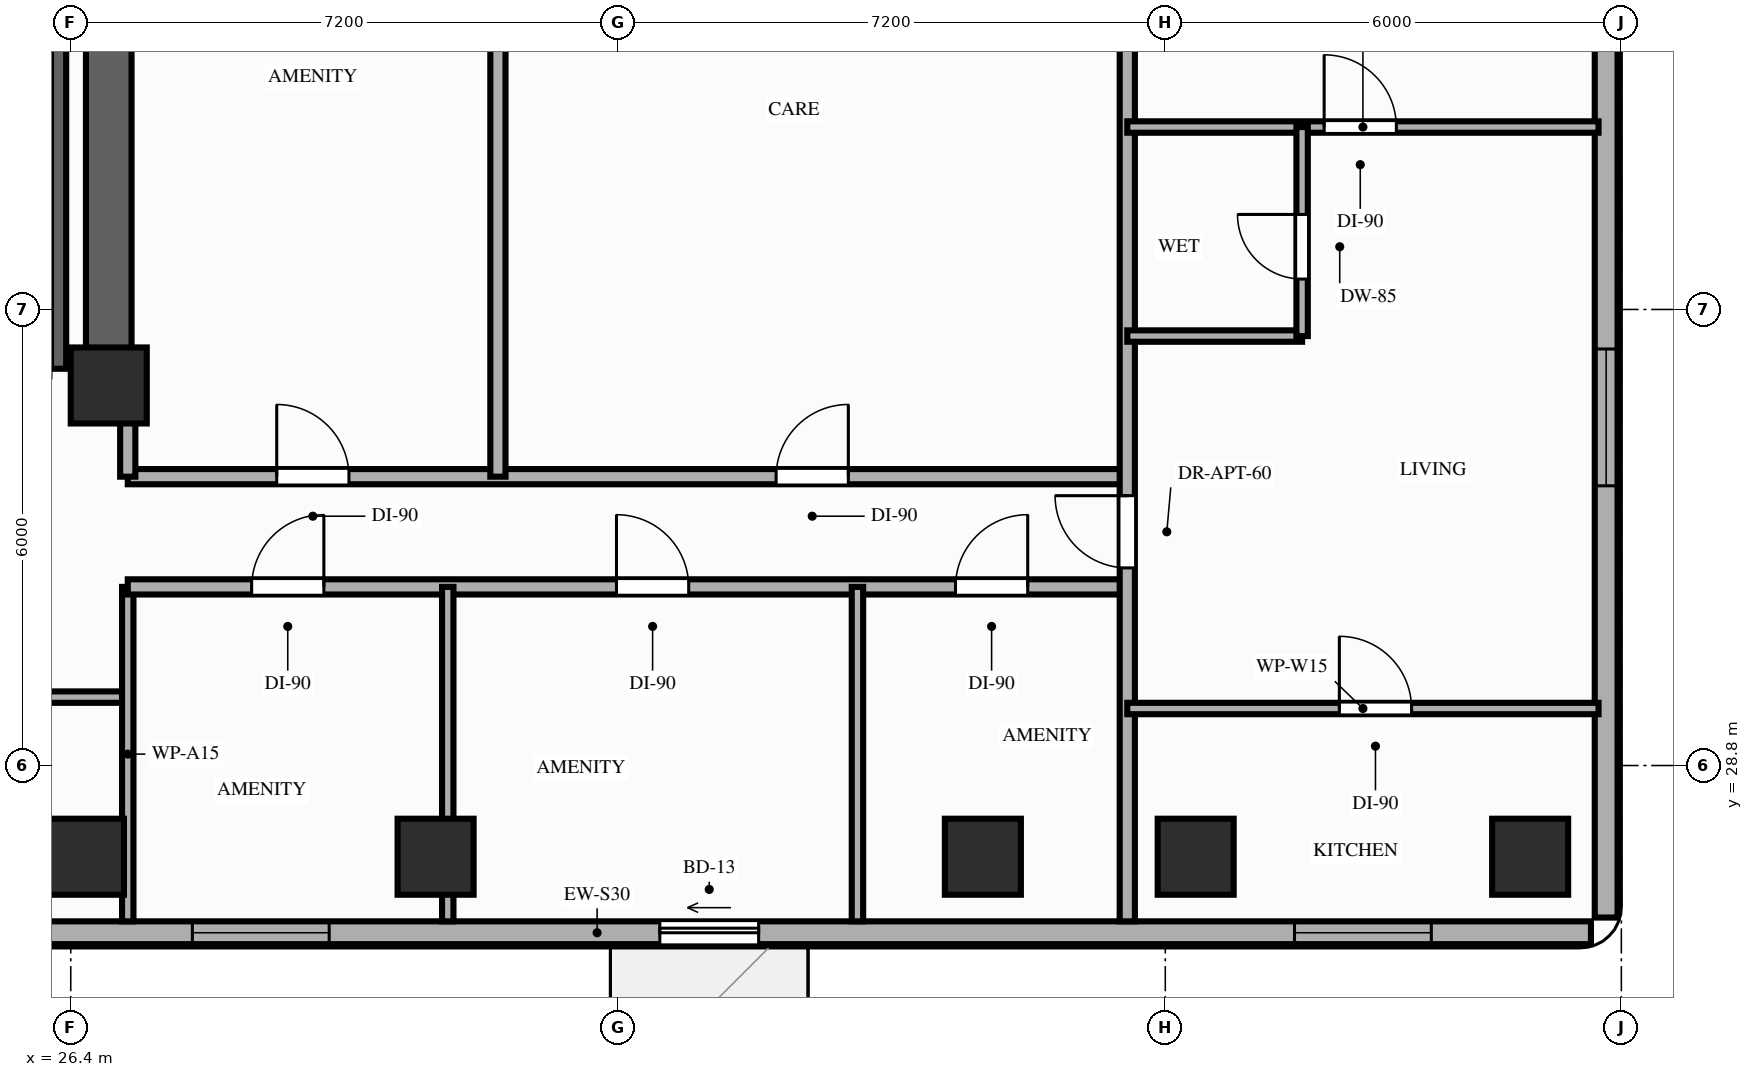
"""IFC4 building model, lengths in metres.
Left out: names, types, materials, properties, quantities, classifications, styles, units other than length and angle.
Written with IfcOpenShell. Run it as: python <this file> out.ifc"""

import sys

from ifc_helpers import new_model, si_unit, direction, frame, frame_2d, origin, origin_2d, place, context, subcontext, project, spatial, rectangle, extrude, element, fill, save


model = new_model("IFC4")
c1 = context("Model", 3, precision=1e-05, world=origin(), true_north=direction((0.0, 1.0)))
c2 = subcontext(c1, "Body", "Model", "MODEL_VIEW")
j1 = project(units=[si_unit("LENGTHUNIT", "METRE"), si_unit("PLANEANGLEUNIT", "RADIAN")], contexts=[c1])
p1 = place(None, origin())
s1 = spatial("IfcSite", under=j1, at=p1, CompositionType="ELEMENT")
p2 = place(p1, origin())
s2 = spatial("IfcBuilding", under=s1, at=p2, CompositionType="ELEMENT")
p3 = place(p2, frame((0.0, 0.0, 142.6)))
s3 = spatial("IfcBuildingStorey", under=s2, at=p3, CompositionType="ELEMENT", Elevation=142.6)
for number, where, z_axis, x_axis in (
    (1, (26.9, 33.8, 0.0), (0.0, 0.0, 1.0), (1.0, 0.0, 0.0)),
    (2, (26.6, 27.6, 0.0), (0.0, 0.0, 1.0), (1.0, 0.0, 0.0)),
    (3, (31.2, 27.6, 0.0), (0.0, 0.0, 1.0), (1.0, 0.0, 0.0)),
    (4, (38.4, 27.6, 0.0), (0.0, 0.0, 1.0), (1.0, 0.0, 0.0)),
    (5, (41.2, 27.6, 0.0), (0.0, 0.0, 1.0), (1.0, 0.0, 0.0)),
    (6, (45.6, 27.6, 0.0), (0.0, 0.0, 1.0), (1.0, 0.0, 0.0)),
):
    element("IfcColumn", number, at=place(p3, frame(where, z_axis=z_axis, x_axis=x_axis)), inside=s3, PredefinedType="COLUMN", context=c2, shape_type="SweptSolid", body=[
        extrude(rectangle(XDim=1.0, YDim=1.0, at=origin_2d()), origin(), (0.0, 0.0, 1.0), 3.2),
    ])
p4 = place(p3, frame((20.25, 26.6, 0.0), z_axis=(0.0, 0.0, 1.0), x_axis=(1.0, 0.0, 0.0)))
e7 = element("IfcWall", 7, at=p4, inside=s3, PredefinedType="STANDARD", context=c2, shape_type="SweptSolid", body=[
    extrude(rectangle(XDim=26.15, YDim=0.3, at=frame_2d((13.075, 0.0))), origin(), (0.0, 0.0, 1.0), 2.71),
])
p5 = place(p4, frame((13.9, 0.0, 0.0)))
e8 = element("IfcOpeningElement", 8, at=p5, cuts=e7, PredefinedType="OPENING", context=c2, shape_type="SweptSolid", body=[
    extrude(rectangle(XDim=1.3, YDim=2.08, at=frame_2d((0.65, 1.04))), frame((0.0, 0.16, 0.0), z_axis=(0.0, -1.0, 0.0), x_axis=(1.0, 0.0, 0.0)), (0.0, 0.0, 1.0), 0.32),
])
p6 = place(p4, frame((2.25, 0.0, 0.85)))
e9 = element("IfcOpeningElement", 9, at=p6, cuts=e7, PredefinedType="OPENING", context=c2, shape_type="SweptSolid", body=[
    extrude(rectangle(XDim=1.8, YDim=1.61, at=frame_2d((0.9, 0.805))), frame((0.0, 0.16, 0.0), z_axis=(0.0, -1.0, 0.0), x_axis=(1.0, 0.0, 0.0)), (0.0, 0.0, 1.0), 0.32),
])
p7 = place(p4, frame((7.75, 0.0, 0.85)))
e10 = element("IfcOpeningElement", 10, at=p7, cuts=e7, PredefinedType="OPENING", context=c2, shape_type="SweptSolid", body=[
    extrude(rectangle(XDim=1.8, YDim=1.61, at=frame_2d((0.9, 0.805))), frame((0.0, 0.16, 0.0), z_axis=(0.0, -1.0, 0.0), x_axis=(1.0, 0.0, 0.0)), (0.0, 0.0, 1.0), 0.32),
])
p8 = place(p4, frame((22.25, 0.0, 0.85)))
e11 = element("IfcOpeningElement", 11, at=p8, cuts=e7, PredefinedType="OPENING", context=c2, shape_type="SweptSolid", body=[
    extrude(rectangle(XDim=1.8, YDim=1.61, at=frame_2d((0.9, 0.805))), frame((0.0, 0.16, 0.0), z_axis=(0.0, -1.0, 0.0), x_axis=(1.0, 0.0, 0.0)), (0.0, 0.0, 1.0), 0.32),
])
p9 = place(p3, frame((46.6, 26.8, 0.0), z_axis=(0.0, 0.0, 1.0), x_axis=(0.0, 1.0, 0.0)))
e12 = element("IfcWall", 12, at=p9, inside=s3, PredefinedType="STANDARD", context=c2, shape_type="SweptSolid", body=[
    extrude(rectangle(XDim=15.35, YDim=0.3, at=frame_2d((7.675, 0.0))), origin(), (0.0, 0.0, 1.0), 3.02),
])
p10 = place(p9, frame((5.68, 0.0, 0.85)))
e13 = element("IfcOpeningElement", 13, at=p10, cuts=e12, PredefinedType="OPENING", context=c2, shape_type="SweptSolid", body=[
    extrude(rectangle(XDim=1.8, YDim=1.75, at=frame_2d((0.9, 0.875))), frame((0.0, 0.16, 0.0), z_axis=(0.0, -1.0, 0.0), x_axis=(1.0, 0.0, 0.0)), (0.0, 0.0, 1.0), 0.32),
])
p11 = place(p3, frame((26.9, 33.8, 0.0), z_axis=(0.0, 0.0, 1.0), x_axis=(0.0, 1.0, 0.0)))
e14 = element("IfcWall", 14, at=p11, inside=s3, PredefinedType="SHEAR", context=c2, shape_type="SweptSolid", body=[
    extrude(rectangle(XDim=7.95, YDim=0.6, at=frame_2d((3.975, 0.0))), origin(), (0.0, 0.0, 1.0), 3.02),
])
p12 = place(p3, frame((26.24, 34.02, 0.0), z_axis=(0.0, 0.0, 1.0), x_axis=(0.0, 1.0, 0.0)))
e15 = element("IfcWall", 15, at=p12, inside=s3, PredefinedType="SHEAR", context=c2, shape_type="SweptSolid", body=[
    extrude(rectangle(XDim=7.78, YDim=0.2, at=frame_2d((3.89, 0.0))), origin(), (0.0, 0.0, 1.0), 3.02),
])
p13 = place(p3, frame((20.45, 29.7, 0.0), z_axis=(0.0, 0.0, 1.0), x_axis=(1.0, 0.0, 0.0)))
e16 = element("IfcWall", 16, at=p13, inside=s3, PredefinedType="PARTITIONING", context=c2, shape_type="SweptSolid", body=[
    extrude(rectangle(XDim=6.7, YDim=0.15, at=frame_2d((3.35, 0.0))), origin(), (0.0, 0.0, 1.0), 3.02),
])
p14 = place(p13, frame((2.8, 0.0, 0.0)))
e17 = element("IfcOpeningElement", 17, at=p14, cuts=e16, PredefinedType="OPENING", context=c2, shape_type="SweptSolid", body=[
    extrude(rectangle(XDim=0.95, YDim=2.15, at=frame_2d((0.475, 1.075))), frame((0.0, 0.085, 0.0), z_axis=(0.0, -1.0, 0.0), x_axis=(1.0, 0.0, 0.0)), (0.0, 0.0, 1.0), 0.17),
])
p15 = place(p3, frame((27.15, 26.75, 0.0), z_axis=(0.0, 0.0, 1.0), x_axis=(0.0, 1.0, 0.0)))
e18 = element("IfcWall", 18, at=p15, inside=s3, PredefinedType="PARTITIONING", context=c2, shape_type="SweptSolid", body=[
    extrude(rectangle(XDim=4.4, YDim=0.15, at=frame_2d((2.2, 0.0))), origin(), (0.0, 0.0, 1.0), 2.45),
])
p16 = place(p3, frame((27.15, 31.15, 0.0), z_axis=(0.0, 0.0, 1.0), x_axis=(1.0, 0.0, 0.0)))
e19 = element("IfcWall", 19, at=p16, inside=s3, PredefinedType="PARTITIONING", context=c2, shape_type="SweptSolid", body=[
    extrude(rectangle(XDim=13.15, YDim=0.2, at=frame_2d((6.575, 0.0))), origin(), (0.0, 0.0, 1.0), 2.45),
])
p17 = place(p16, frame((1.63, 0.0, 0.0)))
e20 = element("IfcOpeningElement", 20, at=p17, cuts=e19, PredefinedType="OPENING", context=c2, shape_type="SweptSolid", body=[
    extrude(rectangle(XDim=0.95, YDim=2.15, at=frame_2d((0.475, 1.075))), frame((0.0, 0.11, 0.0), z_axis=(0.0, -1.0, 0.0), x_axis=(1.0, 0.0, 0.0)), (0.0, 0.0, 1.0), 0.22),
])
p18 = place(p16, frame((6.43, 0.0, 0.0)))
e21 = element("IfcOpeningElement", 21, at=p18, cuts=e19, PredefinedType="OPENING", context=c2, shape_type="SweptSolid", body=[
    extrude(rectangle(XDim=0.95, YDim=2.15, at=frame_2d((0.475, 1.075))), frame((0.0, 0.11, 0.0), z_axis=(0.0, -1.0, 0.0), x_axis=(1.0, 0.0, 0.0)), (0.0, 0.0, 1.0), 0.22),
])
p19 = place(p16, frame((10.89, 0.0, 0.0)))
e22 = element("IfcOpeningElement", 22, at=p19, cuts=e19, PredefinedType="OPENING", context=c2, shape_type="SweptSolid", body=[
    extrude(rectangle(XDim=0.95, YDim=2.15, at=frame_2d((0.475, 1.075))), frame((0.0, 0.11, 0.0), z_axis=(0.0, -1.0, 0.0), x_axis=(1.0, 0.0, 0.0)), (0.0, 0.0, 1.0), 0.22),
])
p20 = place(p3, frame((27.15, 32.6, 0.0), z_axis=(0.0, 0.0, 1.0), x_axis=(1.0, 0.0, 0.0)))
e23 = element("IfcWall", 23, at=p20, inside=s3, PredefinedType="PARTITIONING", context=c2, shape_type="SweptSolid", body=[
    extrude(rectangle(XDim=13.15, YDim=0.2, at=frame_2d((6.575, 0.0))), origin(), (0.0, 0.0, 1.0), 2.45),
])
p21 = place(p20, frame((1.96, 0.0, 0.0)))
e24 = element("IfcOpeningElement", 24, at=p21, cuts=e23, PredefinedType="OPENING", context=c2, shape_type="SweptSolid", body=[
    extrude(rectangle(XDim=0.95, YDim=2.15, at=frame_2d((0.475, 1.075))), frame((0.0, 0.11, 0.0), z_axis=(0.0, -1.0, 0.0), x_axis=(1.0, 0.0, 0.0)), (0.0, 0.0, 1.0), 0.22),
])
p22 = place(p20, frame((8.53, 0.0, 0.0)))
e25 = element("IfcOpeningElement", 25, at=p22, cuts=e23, PredefinedType="OPENING", context=c2, shape_type="SweptSolid", body=[
    extrude(rectangle(XDim=0.95, YDim=2.15, at=frame_2d((0.475, 1.075))), frame((0.0, 0.11, 0.0), z_axis=(0.0, -1.0, 0.0), x_axis=(1.0, 0.0, 0.0)), (0.0, 0.0, 1.0), 0.22),
])
p23 = place(p3, frame((27.15, 32.6, 0.0), z_axis=(0.0, 0.0, 1.0), x_axis=(0.0, 1.0, 0.0)))
e26 = element("IfcWall", 26, at=p23, inside=s3, PredefinedType="PARTITIONING", context=c2, shape_type="SweptSolid", body=[
    extrude(rectangle(XDim=1.08, YDim=0.2, at=frame_2d((0.54, 0.0))), origin(), (0.0, 0.0, 1.0), 2.45),
])
p24 = place(p3, frame((40.3, 26.75, 0.0), z_axis=(0.0, 0.0, 1.0), x_axis=(0.0, 1.0, 0.0)))
e27 = element("IfcWall", 27, at=p24, inside=s3, PredefinedType="PARTITIONING", context=c2, shape_type="SweptSolid", body=[
    extrude(rectangle(XDim=15.45, YDim=0.2, at=frame_2d((7.725, 0.0))), origin(), (0.0, 0.0, 1.0), 2.45),
])
p25 = place(p24, frame((4.65, 0.0, 0.0)))
e28 = element("IfcOpeningElement", 28, at=p25, cuts=e27, PredefinedType="OPENING", context=c2, shape_type="SweptSolid", body=[
    extrude(rectangle(XDim=0.95, YDim=2.15, at=frame_2d((0.475, 1.075))), frame((0.0, 0.11, 0.0), z_axis=(0.0, -1.0, 0.0), x_axis=(1.0, 0.0, 0.0)), (0.0, 0.0, 1.0), 0.22),
])
p26 = place(p3, frame((40.3, 29.55, 0.0), z_axis=(0.0, 0.0, 1.0), x_axis=(1.0, 0.0, 0.0)))
e29 = element("IfcWall", 29, at=p26, inside=s3, PredefinedType="PARTITIONING", context=c2, shape_type="SweptSolid", body=[
    extrude(rectangle(XDim=6.2, YDim=0.15, at=frame_2d((3.1, 0.0))), origin(), (0.0, 0.0, 1.0), 2.45),
])
p27 = place(p26, frame((2.79, 0.0, 0.0)))
e30 = element("IfcOpeningElement", 30, at=p27, cuts=e29, PredefinedType="OPENING", context=c2, shape_type="SweptSolid", body=[
    extrude(rectangle(XDim=0.95, YDim=2.15, at=frame_2d((0.475, 1.075))), frame((0.0, 0.085, 0.0), z_axis=(0.0, -1.0, 0.0), x_axis=(1.0, 0.0, 0.0)), (0.0, 0.0, 1.0), 0.17),
])
p28 = place(p3, frame((40.3, 37.2, 0.0), z_axis=(0.0, 0.0, 1.0), x_axis=(1.0, 0.0, 0.0)))
e31 = element("IfcWall", 31, at=p28, inside=s3, PredefinedType="PARTITIONING", context=c2, shape_type="SweptSolid", body=[
    extrude(rectangle(XDim=6.2, YDim=0.15, at=frame_2d((3.1, 0.0))), origin(), (0.0, 0.0, 1.0), 2.45),
])
p29 = place(p28, frame((2.59, 0.0, 0.0)))
e32 = element("IfcOpeningElement", 32, at=p29, cuts=e31, PredefinedType="OPENING", context=c2, shape_type="SweptSolid", body=[
    extrude(rectangle(XDim=0.95, YDim=2.15, at=frame_2d((0.475, 1.075))), frame((0.0, 0.085, 0.0), z_axis=(0.0, -1.0, 0.0), x_axis=(1.0, 0.0, 0.0)), (0.0, 0.0, 1.0), 0.17),
])
p30 = place(p3, frame((40.3, 34.45, 0.0), z_axis=(0.0, 0.0, 1.0), x_axis=(1.0, 0.0, 0.0)))
e33 = element("IfcWall", 33, at=p30, inside=s3, PredefinedType="PARTITIONING", context=c2, shape_type="SweptSolid", body=[
    extrude(rectangle(XDim=2.3, YDim=0.15, at=frame_2d((1.15, 0.0))), origin(), (0.0, 0.0, 1.0), 2.45),
])
p31 = place(p3, frame((42.6, 34.45, 0.0), z_axis=(0.0, 0.0, 1.0), x_axis=(0.0, 1.0, 0.0)))
e34 = element("IfcWall", 34, at=p31, inside=s3, PredefinedType="PARTITIONING", context=c2, shape_type="SweptSolid", body=[
    extrude(rectangle(XDim=2.75, YDim=0.15, at=frame_2d((1.375, 0.0))), origin(), (0.0, 0.0, 1.0), 2.61),
])
p32 = place(p31, frame((0.75, 0.0, 0.0)))
e35 = element("IfcOpeningElement", 35, at=p32, cuts=e34, PredefinedType="OPENING", context=c2, shape_type="SweptSolid", body=[
    extrude(rectangle(XDim=0.85, YDim=2.1, at=frame_2d((0.425, 1.05))), frame((0.0, 0.085, 0.0), z_axis=(0.0, -1.0, 0.0), x_axis=(1.0, 0.0, 0.0)), (0.0, 0.0, 1.0), 0.17),
])
for number, where, z_axis, x_axis in (
    (36, (31.36, 26.75, 0.0), (0.0, 0.0, 1.0), (0.0, 1.0, 0.0)),
    (37, (36.75, 26.75, 0.0), (0.0, 0.0, 1.0), (0.0, 1.0, 0.0)),
):
    element("IfcWall", number, at=place(p3, frame(where, z_axis=z_axis, x_axis=x_axis)), inside=s3, PredefinedType="PARTITIONING", context=c2, shape_type="SweptSolid", body=[
        extrude(rectangle(XDim=4.4, YDim=0.15, at=frame_2d((2.2, 0.0))), origin(), (0.0, 0.0, 1.0), 2.45),
    ])
p33 = place(p3, frame((32.02, 32.6, 0.0), z_axis=(0.0, 0.0, 1.0), x_axis=(0.0, 1.0, 0.0)))
e38 = element("IfcWall", 38, at=p33, inside=s3, PredefinedType="PARTITIONING", context=c2, shape_type="SweptSolid", body=[
    extrude(rectangle(XDim=9.6, YDim=0.2, at=frame_2d((4.8, 0.0))), origin(), (0.0, 0.0, 1.0), 2.45),
])
p34 = place(p5, origin())
e39 = element("IfcDoor", 39, at=p34, inside=s3, OperationType="SLIDING_TO_LEFT", PredefinedType="DOOR", context=c2, shape_type="SweptSolid", body=[
    extrude(rectangle(XDim=1.3, YDim=2.08, at=frame_2d((0.65, 1.04))), frame((0.0, 0.025, 0.0), z_axis=(0.0, -1.0, 0.0), x_axis=(1.0, 0.0, 0.0)), (0.0, 0.0, 1.0), 0.05),
])
fill(e8, e39)
p35 = place(p10, origin())
e40 = element("IfcWindow", 40, at=p35, inside=s3, PartitioningType="SINGLE_PANEL", PredefinedType="WINDOW", context=c2, shape_type="SweptSolid", body=[
    extrude(rectangle(XDim=1.8, YDim=1.75, at=frame_2d((0.9, 0.875))), frame((0.0, 0.03, 0.0), z_axis=(0.0, -1.0, 0.0), x_axis=(1.0, 0.0, 0.0)), (0.0, 0.0, 1.0), 0.06),
])
fill(e13, e40)
p36 = place(p7, origin())
e41 = element("IfcWindow", 41, at=p36, inside=s3, PartitioningType="SINGLE_PANEL", PredefinedType="WINDOW", context=c2, shape_type="SweptSolid", body=[
    extrude(rectangle(XDim=1.8, YDim=1.61, at=frame_2d((0.9, 0.805))), frame((0.0, 0.03, 0.0), z_axis=(0.0, -1.0, 0.0), x_axis=(1.0, 0.0, 0.0)), (0.0, 0.0, 1.0), 0.06),
])
fill(e10, e41)
p37 = place(p8, origin())
e42 = element("IfcWindow", 42, at=p37, inside=s3, PartitioningType="SINGLE_PANEL", PredefinedType="WINDOW", context=c2, shape_type="SweptSolid", body=[
    extrude(rectangle(XDim=1.8, YDim=1.61, at=frame_2d((0.9, 0.805))), frame((0.0, 0.03, 0.0), z_axis=(0.0, -1.0, 0.0), x_axis=(1.0, 0.0, 0.0)), (0.0, 0.0, 1.0), 0.06),
])
fill(e11, e42)
p38 = place(p25, origin())
e43 = element("IfcDoor", 43, at=p38, inside=s3, OperationType="SINGLE_SWING_RIGHT", PredefinedType="DOOR", context=c2, shape_type="SweptSolid", body=[
    extrude(rectangle(XDim=0.95, YDim=2.15, at=frame_2d((0.475, 1.075))), frame((0.0, 0.025, 0.0), z_axis=(0.0, -1.0, 0.0), x_axis=(1.0, 0.0, 0.0)), (0.0, 0.0, 1.0), 0.05),
])
fill(e28, e43)
p39 = place(p29, origin())
e44 = element("IfcDoor", 44, at=p39, inside=s3, OperationType="SINGLE_SWING_LEFT", PredefinedType="DOOR", context=c2, shape_type="SweptSolid", body=[
    extrude(rectangle(XDim=0.95, YDim=2.15, at=frame_2d((0.475, 1.075))), frame((0.0, 0.025, 0.0), z_axis=(0.0, -1.0, 0.0), x_axis=(1.0, 0.0, 0.0)), (0.0, 0.0, 1.0), 0.05),
])
fill(e32, e44)
p40 = place(p32, origin())
e45 = element("IfcDoor", 45, at=p40, inside=s3, OperationType="SINGLE_SWING_RIGHT", PredefinedType="DOOR", context=c2, shape_type="SweptSolid", body=[
    extrude(rectangle(XDim=0.85, YDim=2.1, at=frame_2d((0.425, 1.05))), frame((0.0, 0.025, 0.0), z_axis=(0.0, -1.0, 0.0), x_axis=(1.0, 0.0, 0.0)), (0.0, 0.0, 1.0), 0.05),
])
fill(e35, e45)
p41 = place(p27, origin())
e46 = element("IfcDoor", 46, at=p41, inside=s3, OperationType="SINGLE_SWING_LEFT", PredefinedType="DOOR", context=c2, shape_type="SweptSolid", body=[
    extrude(rectangle(XDim=0.95, YDim=2.15, at=frame_2d((0.475, 1.075))), frame((0.0, 0.025, 0.0), z_axis=(0.0, -1.0, 0.0), x_axis=(1.0, 0.0, 0.0)), (0.0, 0.0, 1.0), 0.05),
])
fill(e30, e46)
p42 = place(p17, origin())
e47 = element("IfcDoor", 47, at=p42, inside=s3, OperationType="SINGLE_SWING_RIGHT", PredefinedType="DOOR", context=c2, shape_type="SweptSolid", body=[
    extrude(rectangle(XDim=0.95, YDim=2.15, at=frame_2d((0.475, 1.075))), frame((0.0, 0.025, 0.0), z_axis=(0.0, -1.0, 0.0), x_axis=(1.0, 0.0, 0.0)), (0.0, 0.0, 1.0), 0.05),
])
fill(e20, e47)
p43 = place(p18, origin())
e48 = element("IfcDoor", 48, at=p43, inside=s3, OperationType="SINGLE_SWING_LEFT", PredefinedType="DOOR", context=c2, shape_type="SweptSolid", body=[
    extrude(rectangle(XDim=0.95, YDim=2.15, at=frame_2d((0.475, 1.075))), frame((0.0, 0.025, 0.0), z_axis=(0.0, -1.0, 0.0), x_axis=(1.0, 0.0, 0.0)), (0.0, 0.0, 1.0), 0.05),
])
fill(e21, e48)
p44 = place(p19, origin())
e49 = element("IfcDoor", 49, at=p44, inside=s3, OperationType="SINGLE_SWING_RIGHT", PredefinedType="DOOR", context=c2, shape_type="SweptSolid", body=[
    extrude(rectangle(XDim=0.95, YDim=2.15, at=frame_2d((0.475, 1.075))), frame((0.0, 0.025, 0.0), z_axis=(0.0, -1.0, 0.0), x_axis=(1.0, 0.0, 0.0)), (0.0, 0.0, 1.0), 0.05),
])
fill(e22, e49)
p45 = place(p21, origin())
e50 = element("IfcDoor", 50, at=p45, inside=s3, OperationType="SINGLE_SWING_LEFT", PredefinedType="DOOR", context=c2, shape_type="SweptSolid", body=[
    extrude(rectangle(XDim=0.95, YDim=2.15, at=frame_2d((0.475, 1.075))), frame((0.0, 0.025, 0.0), z_axis=(0.0, -1.0, 0.0), x_axis=(1.0, 0.0, 0.0)), (0.0, 0.0, 1.0), 0.05),
])
fill(e24, e50)
p46 = place(p22, origin())
e51 = element("IfcDoor", 51, at=p46, inside=s3, OperationType="SINGLE_SWING_RIGHT", PredefinedType="DOOR", context=c2, shape_type="SweptSolid", body=[
    extrude(rectangle(XDim=0.95, YDim=2.15, at=frame_2d((0.475, 1.075))), frame((0.0, 0.025, 0.0), z_axis=(0.0, -1.0, 0.0), x_axis=(1.0, 0.0, 0.0)), (0.0, 0.0, 1.0), 0.05),
])
fill(e25, e51)
save(model, sys.argv[1])
